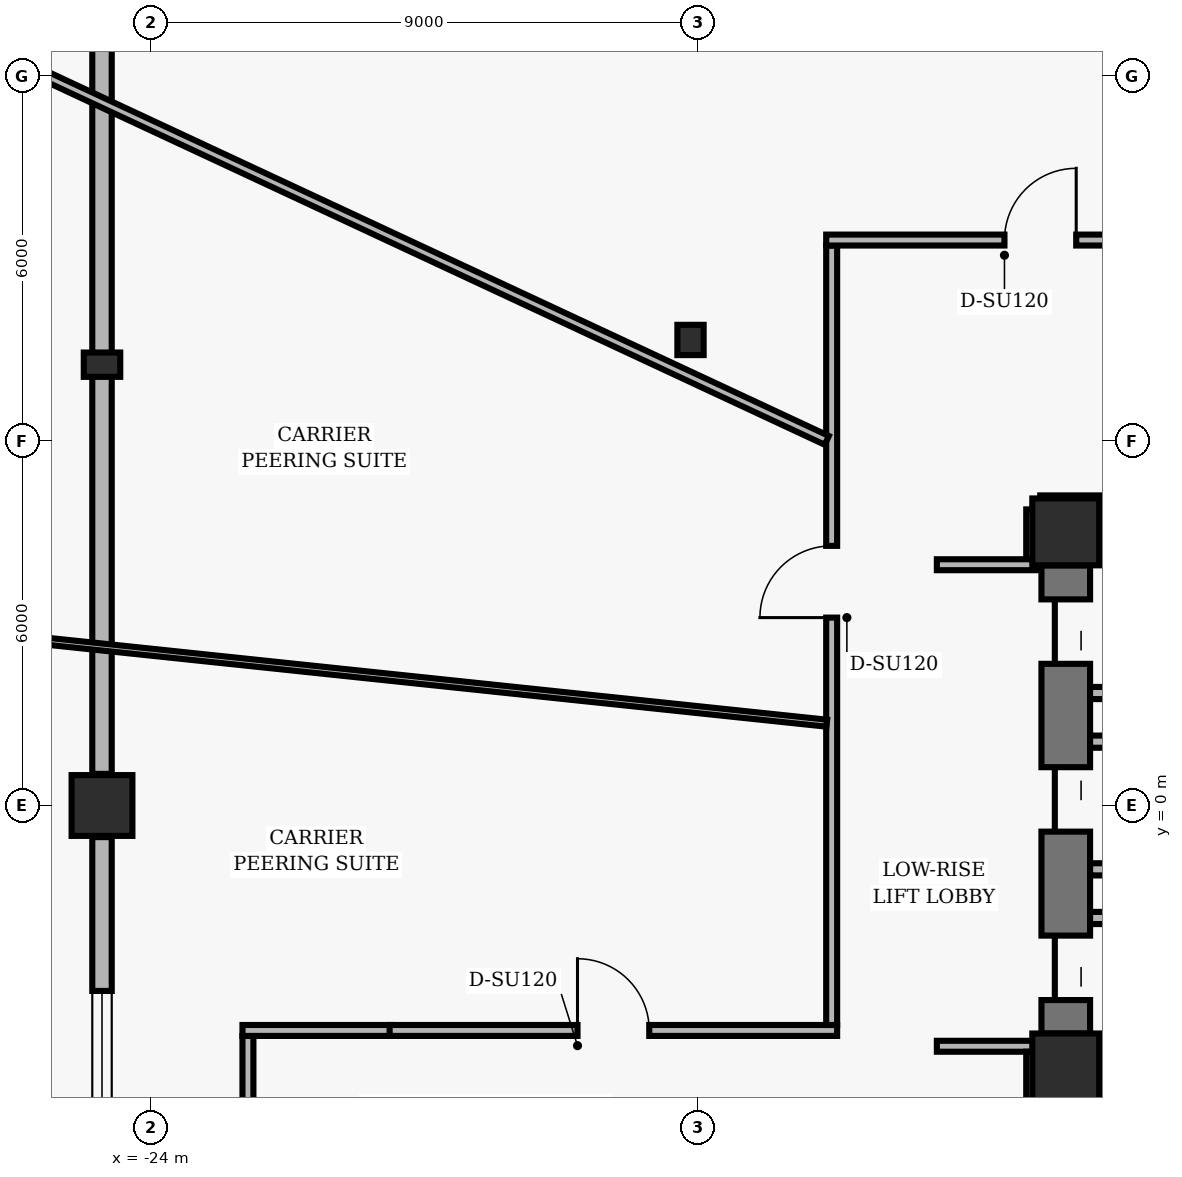
"""IFC4 building model, lengths in metres.
Left out: names, types, materials, properties, quantities, classifications, styles, units other than length and angle.
Written with IfcOpenShell. Run it as: python <this file> out.ifc"""

import sys

from ifc_helpers import new_model, si_unit, direction, frame, frame_2d, origin, origin_2d, place, context, subcontext, project, spatial, rectangle, hollow_rectangle, i_section, extrude, element, fill, save


model = new_model("IFC4")
c1 = context("Model", 3, precision=1e-05, world=origin(), true_north=direction((0.0, 1.0)))
c2 = subcontext(c1, "Body", "Model", "MODEL_VIEW")
j1 = project(units=[si_unit("LENGTHUNIT", "METRE"), si_unit("PLANEANGLEUNIT", "RADIAN")], contexts=[c1])
p1 = place(None, origin())
s1 = spatial("IfcSite", under=j1, at=p1, CompositionType="ELEMENT")
p2 = place(p1, origin())
s2 = spatial("IfcBuilding", under=s1, at=p2, CompositionType="ELEMENT")
p3 = place(p2, frame((0.0, 0.0, 4.8)))
s3 = spatial("IfcBuildingStorey", under=s2, at=p3, CompositionType="ELEMENT", Elevation=4.8)
for number, where, z_axis, x_axis in (
    (1, (-8.95, 4.5, 0.0), (0.0, 0.0, 1.0), (1.0, 0.0, 0.0)),
    (2, (-8.95, -4.3, 0.0), (0.0, 0.0, 1.0), (1.0, 0.0, 0.0)),
):
    element("IfcColumn", number, at=place(p3, frame(where, z_axis=z_axis, x_axis=x_axis)), inside=s3, PredefinedType="COLUMN", context=c2, shape_type="SweptSolid", body=[
        extrude(hollow_rectangle(XDim=1.1, YDim=1.1, WallThickness=0.07, InnerFilletRadius=0.02, OuterFilletRadius=0.04, at=origin_2d()), origin(), (0.0, 0.0, 1.0), 3.52),
    ])
p4 = place(p3, frame((-8.95, -3.75, 0.0), z_axis=(0.0, 0.0, 1.0), x_axis=(0.0, 1.0, 0.0)))
e3 = element("IfcWall", 3, at=p4, inside=s3, PredefinedType="SHEAR", context=c2, shape_type="SweptSolid", body=[
    extrude(rectangle(XDim=7.7, YDim=0.8, at=frame_2d((3.85, 0.0))), origin(), (0.0, 0.0, 1.0), 3.218),
])
p5 = place(p4, frame((0.55, 0.0, 0.0)))
e4 = element("IfcOpeningElement", 4, at=p5, cuts=e3, PredefinedType="OPENING", context=c2, shape_type="SweptSolid", body=[
    extrude(rectangle(XDim=1.06, YDim=2.04, at=frame_2d((0.53, 1.02))), frame((0.0, 0.41, 0.0), z_axis=(0.0, -1.0, 0.0), x_axis=(1.0, 0.0, 0.0)), (0.0, 0.0, 1.0), 0.82),
])
p6 = place(p4, frame((3.32, 0.0, 0.0)))
e5 = element("IfcOpeningElement", 5, at=p6, cuts=e3, PredefinedType="OPENING", context=c2, shape_type="SweptSolid", body=[
    extrude(rectangle(XDim=1.06, YDim=2.04, at=frame_2d((0.53, 1.02))), frame((0.0, 0.41, 0.0), z_axis=(0.0, -1.0, 0.0), x_axis=(1.0, 0.0, 0.0)), (0.0, 0.0, 1.0), 0.82),
])
p7 = place(p4, frame((6.08, 0.0, 0.0)))
e6 = element("IfcOpeningElement", 6, at=p7, cuts=e3, PredefinedType="OPENING", context=c2, shape_type="SweptSolid", body=[
    extrude(rectangle(XDim=1.06, YDim=2.04, at=frame_2d((0.53, 1.02))), frame((0.0, 0.41, 0.0), z_axis=(0.0, -1.0, 0.0), x_axis=(1.0, 0.0, 0.0)), (0.0, 0.0, 1.0), 0.82),
])
for number, where, z_axis, x_axis in (
    (7, (-8.4, 4.5, 0.0), (0.0, 0.0, 1.0), (1.0, 0.0, 0.0)),
    (8, (-8.4, -4.3, 0.0), (0.0, 0.0, 1.0), (1.0, 0.0, 0.0)),
):
    element("IfcWall", number, at=place(p3, frame(where, z_axis=z_axis, x_axis=x_axis)), inside=s3, PredefinedType="SHEAR", context=c2, shape_type="SweptSolid", body=[
        extrude(rectangle(XDim=1.8, YDim=0.4, at=frame_2d((0.9, 0.0))), origin(), (0.0, 0.0, 1.0), 3.218),
    ])
p8 = place(p3, frame((-24.8, 0.0, 0.0), z_axis=(0.0, 0.0, 1.0), x_axis=(1.0, 0.0, 0.0)))
e9 = element("IfcColumn", 9, at=p8, inside=s3, PredefinedType="COLUMN", context=c2, shape_type="SweptSolid", body=[
    extrude(rectangle(XDim=1.0, YDim=1.0, at=origin_2d()), origin(), (0.0, 0.0, 1.0), 3.52),
])
p9 = place(p3, frame((-15.121, 7.657, 0.0), z_axis=(0.0, 0.0, 1.0), x_axis=(1.0, 0.0, 0.0)))
e10 = element("IfcColumn", 10, at=p9, inside=s3, PredefinedType="COLUMN", context=c2, shape_type="SweptSolid", body=[
    extrude(i_section(OverallWidth=0.432, OverallDepth=0.498, WebThickness=0.056, FlangeThickness=0.089, FilletRadius=0.025, at=origin_2d()), origin(), (0.0, 0.0, 1.0), 3.52),
])
p10 = place(p3, frame((-24.8, 7.25, 0.0), z_axis=(0.0, 0.0, 1.0), x_axis=(1.0, 0.0, 0.0)))
e11 = element("IfcColumn", 11, at=p10, inside=s3, PredefinedType="PILASTER", context=c2, shape_type="SweptSolid", body=[
    extrude(rectangle(XDim=0.6, YDim=0.4, at=origin_2d()), origin(), (0.0, 0.0, 1.0), 3.52),
])
p11 = place(p3, frame((-24.8, 0.52, 0.0), z_axis=(0.0, 0.0, 1.0), x_axis=(0.0, 1.0, 0.0)))
e12 = element("IfcWall", 12, at=p11, inside=s3, PredefinedType="SOLIDWALL", context=c2, shape_type="SweptSolid", body=[
    extrude(rectangle(XDim=13.46, YDim=0.32, at=frame_2d((6.73, 0.0))), origin(), (0.0, 0.0, 1.0), 2.261),
])
p12 = place(p3, frame((-24.8, -13.98, 0.0), z_axis=(0.0, 0.0, 1.0), x_axis=(0.0, 1.0, 0.0)))
e13 = element("IfcWall", 13, at=p12, inside=s3, PredefinedType="SOLIDWALL", context=c2, shape_type="SweptSolid", body=[
    extrude(rectangle(XDim=13.46, YDim=0.32, at=frame_2d((6.73, 0.0))), origin(), (0.0, 0.0, 1.0), 2.588),
])
p13 = place(p12, frame((2.53, 0.0, 0.65)))
e14 = element("IfcOpeningElement", 14, at=p13, cuts=e13, PredefinedType="OPENING", context=c2, shape_type="SweptSolid", body=[
    extrude(rectangle(XDim=2.0, YDim=1.6, at=frame_2d((1.0, 0.8))), frame((0.0, 0.17, 0.0), z_axis=(0.0, -1.0, 0.0), x_axis=(1.0, 0.0, 0.0)), (0.0, 0.0, 1.0), 0.34),
])
p14 = place(p12, frame((8.93, 0.0, 0.65)))
e15 = element("IfcOpeningElement", 15, at=p14, cuts=e13, PredefinedType="OPENING", context=c2, shape_type="SweptSolid", body=[
    extrude(rectangle(XDim=2.0, YDim=1.6, at=frame_2d((1.0, 0.8))), frame((0.0, 0.17, 0.0), z_axis=(0.0, -1.0, 0.0), x_axis=(1.0, 0.0, 0.0)), (0.0, 0.0, 1.0), 0.34),
])
for number, where, z_axis, x_axis in (
    (16, (-8.55, -1.85, 0.0), (0.0, 0.0, 1.0), (1.0, 0.0, 0.0)),
    (17, (-8.55, 1.85, 0.0), (0.0, 0.0, 1.0), (1.0, 0.0, 0.0)),
):
    element("IfcWall", number, at=place(p3, frame(where, z_axis=z_axis, x_axis=x_axis)), inside=s3, PredefinedType="PARTITIONING", context=c2, shape_type="SweptSolid", body=[
        extrude(rectangle(XDim=2.1, YDim=0.2, at=frame_2d((1.05, 0.0))), origin(), (0.0, 0.0, 1.0), 3.193),
    ])
for number, where, z_axis, x_axis in (
    (18, (-8.55, -1.05, 0.0), (0.0, 0.0, 1.0), (1.0, 0.0, 0.0)),
    (19, (-8.55, 1.05, 0.0), (0.0, 0.0, 1.0), (1.0, 0.0, 0.0)),
):
    element("IfcWall", number, at=place(p3, frame(where, z_axis=z_axis, x_axis=x_axis)), inside=s3, PredefinedType="PARTITIONING", context=c2, shape_type="SweptSolid", body=[
        extrude(rectangle(XDim=1.91, YDim=0.2, at=frame_2d((0.955, 0.0))), origin(), (0.0, 0.0, 1.0), 3.193),
    ])
p15 = place(p3, frame((-22.4, -6.12, 0.0), z_axis=(0.0, 0.0, 1.0), x_axis=(0.0, 1.0, 0.0)))
e20 = element("IfcWall", 20, at=p15, inside=s3, PredefinedType="PARTITIONING", context=c2, shape_type="SweptSolid", body=[
    extrude(rectangle(XDim=2.33, YDim=0.18, at=frame_2d((1.165, 0.0))), origin(), (0.0, 0.0, 1.0), 3.193),
])
p16 = place(p3, frame((-22.49, -3.7, 0.0), z_axis=(0.0, 0.0, 1.0), x_axis=(1.0, 0.0, 0.0)))
e21 = element("IfcWall", 21, at=p16, inside=s3, PredefinedType="PARTITIONING", context=c2, shape_type="SweptSolid", body=[
    extrude(rectangle(XDim=2.46, YDim=0.18, at=frame_2d((1.23, 0.0))), origin(), (0.0, 0.0, 1.0), 3.193),
])
p17 = place(p3, frame((-20.07, -3.7, 0.0), z_axis=(0.0, 0.0, 1.0), x_axis=(1.0, 0.0, 0.0)))
e22 = element("IfcWall", 22, at=p17, inside=s3, PredefinedType="PARTITIONING", context=c2, shape_type="SweptSolid", body=[
    extrude(rectangle(XDim=7.36, YDim=0.18, at=frame_2d((3.68, 0.0))), origin(), (0.0, 0.0, 1.0), 2.246),
])
p18 = place(p17, frame((3.09, 0.0, 0.0)))
e23 = element("IfcOpeningElement", 23, at=p18, cuts=e22, PredefinedType="OPENING", context=c2, shape_type="SweptSolid", body=[
    extrude(rectangle(XDim=1.18, YDim=2.02, at=frame_2d((0.59, 1.01))), frame((0.0, 0.1, 0.0), z_axis=(0.0, -1.0, 0.0), x_axis=(1.0, 0.0, 0.0)), (0.0, 0.0, 1.0), 0.2),
])
p19 = place(p3, frame((-12.8, -3.61, 0.0), z_axis=(0.0, 0.0, 1.0), x_axis=(0.0, 1.0, 0.0)))
e24 = element("IfcWall", 24, at=p19, inside=s3, PredefinedType="PARTITIONING", context=c2, shape_type="SweptSolid", body=[
    extrude(rectangle(XDim=12.82, YDim=0.18, at=frame_2d((6.41, 0.0))), origin(), (0.0, 0.0, 1.0), 3.193),
])
p20 = place(p19, frame((6.7, 0.0, 0.0)))
e25 = element("IfcOpeningElement", 25, at=p20, cuts=e24, PredefinedType="OPENING", context=c2, shape_type="SweptSolid", body=[
    extrude(rectangle(XDim=1.18, YDim=2.02, at=frame_2d((0.59, 1.01))), frame((0.0, 0.1, 0.0), z_axis=(0.0, -1.0, 0.0), x_axis=(1.0, 0.0, 0.0)), (0.0, 0.0, 1.0), 0.2),
])
p21 = place(p3, frame((-12.89, 9.3, 0.0), z_axis=(0.0, 0.0, 1.0), x_axis=(1.0, 0.0, 0.0)))
e26 = element("IfcWall", 26, at=p21, inside=s3, PredefinedType="PARTITIONING", context=c2, shape_type="SweptSolid", body=[
    extrude(rectangle(XDim=25.78, YDim=0.18, at=frame_2d((12.89, 0.0))), origin(), (0.0, 0.0, 1.0), 2.76),
])
p22 = place(p21, frame((16.588, 0.0, 0.0)))
e27 = element("IfcOpeningElement", 27, at=p22, cuts=e26, PredefinedType="OPENING", context=c2, shape_type="SweptSolid", body=[
    extrude(rectangle(XDim=0.96, YDim=2.02, at=frame_2d((0.48, 1.01))), frame((0.0, 0.1, 0.0), z_axis=(0.0, -1.0, 0.0), x_axis=(1.0, 0.0, 0.0)), (0.0, 0.0, 1.0), 0.2),
])
p23 = place(p21, frame((9.618, 0.0, 0.0)))
e28 = element("IfcOpeningElement", 28, at=p23, cuts=e26, PredefinedType="OPENING", context=c2, shape_type="SweptSolid", body=[
    extrude(rectangle(XDim=1.18, YDim=2.02, at=frame_2d((0.59, 1.01))), frame((0.0, 0.1, 0.0), z_axis=(0.0, -1.0, 0.0), x_axis=(1.0, 0.0, 0.0)), (0.0, 0.0, 1.0), 0.2),
])
p24 = place(p21, frame((2.932, 0.0, 0.0)))
e29 = element("IfcOpeningElement", 29, at=p24, cuts=e26, PredefinedType="OPENING", context=c2, shape_type="SweptSolid", body=[
    extrude(rectangle(XDim=1.18, YDim=2.02, at=frame_2d((0.59, 1.01))), frame((0.0, 0.1, 0.0), z_axis=(0.0, -1.0, 0.0), x_axis=(1.0, 0.0, 0.0)), (0.0, 0.0, 1.0), 0.2),
])
p25 = place(p3, frame((-11.07, -3.96, 0.0), z_axis=(0.0, 0.0, 1.0), x_axis=(1.0, 0.0, 0.0)))
e30 = element("IfcWall", 30, at=p25, inside=s3, PredefinedType="PARTITIONING", context=c2, shape_type="SweptSolid", body=[
    extrude(rectangle(XDim=1.65, YDim=0.18, at=frame_2d((0.825, 0.0))), origin(), (0.0, 0.0, 1.0), 2.246),
])
p26 = place(p3, frame((-9.51, -4.05, 0.0), z_axis=(0.0, 0.0, 1.0), x_axis=(0.0, -1.0, 0.0)))
e31 = element("IfcWall", 31, at=p26, inside=s3, PredefinedType="PARTITIONING", context=c2, shape_type="SweptSolid", body=[
    extrude(rectangle(XDim=0.82, YDim=0.18, at=frame_2d((0.41, 0.0))), origin(), (0.0, 0.0, 1.0), 3.193),
])
p27 = place(p3, frame((-6.562, 5.01, 0.0), z_axis=(0.0, 0.0, 1.0), x_axis=(-1.0, 0.0, 0.0)))
e32 = element("IfcWall", 32, at=p27, inside=s3, PredefinedType="PARTITIONING", context=c2, shape_type="SweptSolid", body=[
    extrude(rectangle(XDim=2.808, YDim=0.18, at=frame_2d((1.404, 0.0))), origin(), (0.0, 0.0, 1.0), 3.193),
])
p28 = place(p3, frame((-9.51, 4.87, 0.0), z_axis=(0.0, 0.0, 1.0), x_axis=(0.0, -1.0, 0.0)))
e33 = element("IfcWall", 33, at=p28, inside=s3, PredefinedType="PARTITIONING", context=c2, shape_type="SweptSolid", body=[
    extrude(rectangle(XDim=0.82, YDim=0.18, at=frame_2d((0.41, 0.0))), origin(), (0.0, 0.0, 1.0), 3.193),
])
p29 = place(p3, frame((-9.42, 3.96, 0.0), z_axis=(0.0, 0.0, 1.0), x_axis=(-1.0, 0.0, 0.0)))
e34 = element("IfcWall", 34, at=p29, inside=s3, PredefinedType="PARTITIONING", context=c2, shape_type="SweptSolid", body=[
    extrude(rectangle(XDim=1.65, YDim=0.18, at=frame_2d((0.825, 0.0))), origin(), (0.0, 0.0, 1.0), 3.193),
])
p30 = place(p3, frame((-6.091, 9.38, 0.0), z_axis=(0.0, 0.0, 1.0), x_axis=(-0.544644853477, 0.838666789364, 0.0)))
e35 = element("IfcWall", 35, at=p30, inside=s3, PredefinedType="PARTITIONING", context=c2, shape_type="SweptSolid", body=[
    extrude(rectangle(XDim=20.938, YDim=0.24, at=frame_2d((10.469, 0.0))), origin(), (0.0, 0.0, 1.0), 3.193),
])
p31 = place(p3, frame((-12.88, 6.006, 0.0), z_axis=(0.0, 0.0, 1.0), x_axis=(-0.906309362581, 0.422614882959, 0.0)))
e36 = element("IfcWall", 36, at=p31, inside=s3, PredefinedType="PARTITIONING", context=c2, shape_type="SweptSolid", body=[
    extrude(rectangle(XDim=15.017, YDim=0.16, at=frame_2d((7.509, 0.0))), origin(), (0.0, 0.0, 1.0), 3.193),
])
p32 = place(p3, frame((-12.88, 1.354, 0.0), z_axis=(0.0, 0.0, 1.0), x_axis=(-0.994522351217, 0.104524126066, 0.0)))
e37 = element("IfcWall", 37, at=p32, inside=s3, PredefinedType="MOVABLE", context=c2, shape_type="SweptSolid", body=[
    extrude(rectangle(XDim=13.685, YDim=0.115, at=frame_2d((6.843, 0.0))), origin(), (0.0, 0.0, 1.0), 3.193),
])
p33 = place(p14, origin())
e38 = element("IfcWindow", 38, at=p33, inside=s3, PartitioningType="SINGLE_PANEL", PredefinedType="WINDOW", context=c2, shape_type="SweptSolid", body=[
    extrude(rectangle(XDim=2.0, YDim=1.6, at=frame_2d((1.0, 0.8))), frame((0.0, 0.03, 0.0), z_axis=(0.0, -1.0, 0.0), x_axis=(1.0, 0.0, 0.0)), (0.0, 0.0, 1.0), 0.06),
])
fill(e15, e38)
p34 = place(p5, origin())
e39 = element("IfcDoor", 39, at=p34, inside=s3, OperationType="SLIDING_TO_LEFT", PredefinedType="DOOR", context=c2, shape_type="SweptSolid", body=[
    extrude(rectangle(XDim=1.06, YDim=2.04, at=frame_2d((0.53, 1.02))), frame((0.0, 0.025, 0.0), z_axis=(0.0, -1.0, 0.0), x_axis=(1.0, 0.0, 0.0)), (0.0, 0.0, 1.0), 0.05),
])
fill(e4, e39)
p35 = place(p6, origin())
e40 = element("IfcDoor", 40, at=p35, inside=s3, OperationType="SLIDING_TO_RIGHT", PredefinedType="DOOR", context=c2, shape_type="SweptSolid", body=[
    extrude(rectangle(XDim=1.06, YDim=2.04, at=frame_2d((0.53, 1.02))), frame((0.0, 0.025, 0.0), z_axis=(0.0, -1.0, 0.0), x_axis=(1.0, 0.0, 0.0)), (0.0, 0.0, 1.0), 0.05),
])
fill(e5, e40)
p36 = place(p7, origin())
e41 = element("IfcDoor", 41, at=p36, inside=s3, OperationType="SLIDING_TO_LEFT", PredefinedType="DOOR", context=c2, shape_type="SweptSolid", body=[
    extrude(rectangle(XDim=1.06, YDim=2.04, at=frame_2d((0.53, 1.02))), frame((0.0, 0.025, 0.0), z_axis=(0.0, -1.0, 0.0), x_axis=(1.0, 0.0, 0.0)), (0.0, 0.0, 1.0), 0.05),
])
fill(e6, e41)
p37 = place(p18, origin())
e42 = element("IfcDoor", 42, at=p37, inside=s3, OperationType="SINGLE_SWING_LEFT", PredefinedType="DOOR", context=c2, shape_type="SweptSolid", body=[
    extrude(rectangle(XDim=1.18, YDim=2.02, at=frame_2d((0.59, 1.01))), frame((0.0, 0.025, 0.0), z_axis=(0.0, -1.0, 0.0), x_axis=(1.0, 0.0, 0.0)), (0.0, 0.0, 1.0), 0.05),
])
fill(e23, e42)
p38 = place(p24, origin())
e43 = element("IfcDoor", 43, at=p38, inside=s3, OperationType="SINGLE_SWING_RIGHT", PredefinedType="DOOR", context=c2, shape_type="SweptSolid", body=[
    extrude(rectangle(XDim=1.18, YDim=2.02, at=frame_2d((0.59, 1.01))), frame((0.0, 0.025, 0.0), z_axis=(0.0, -1.0, 0.0), x_axis=(1.0, 0.0, 0.0)), (0.0, 0.0, 1.0), 0.05),
])
fill(e29, e43)
p39 = place(p20, origin())
e44 = element("IfcDoor", 44, at=p39, inside=s3, OperationType="SINGLE_SWING_LEFT", PredefinedType="DOOR", context=c2, shape_type="SweptSolid", body=[
    extrude(rectangle(XDim=1.18, YDim=2.02, at=frame_2d((0.59, 1.01))), frame((0.0, 0.025, 0.0), z_axis=(0.0, -1.0, 0.0), x_axis=(1.0, 0.0, 0.0)), (0.0, 0.0, 1.0), 0.05),
])
fill(e25, e44)
save(model, sys.argv[1])
